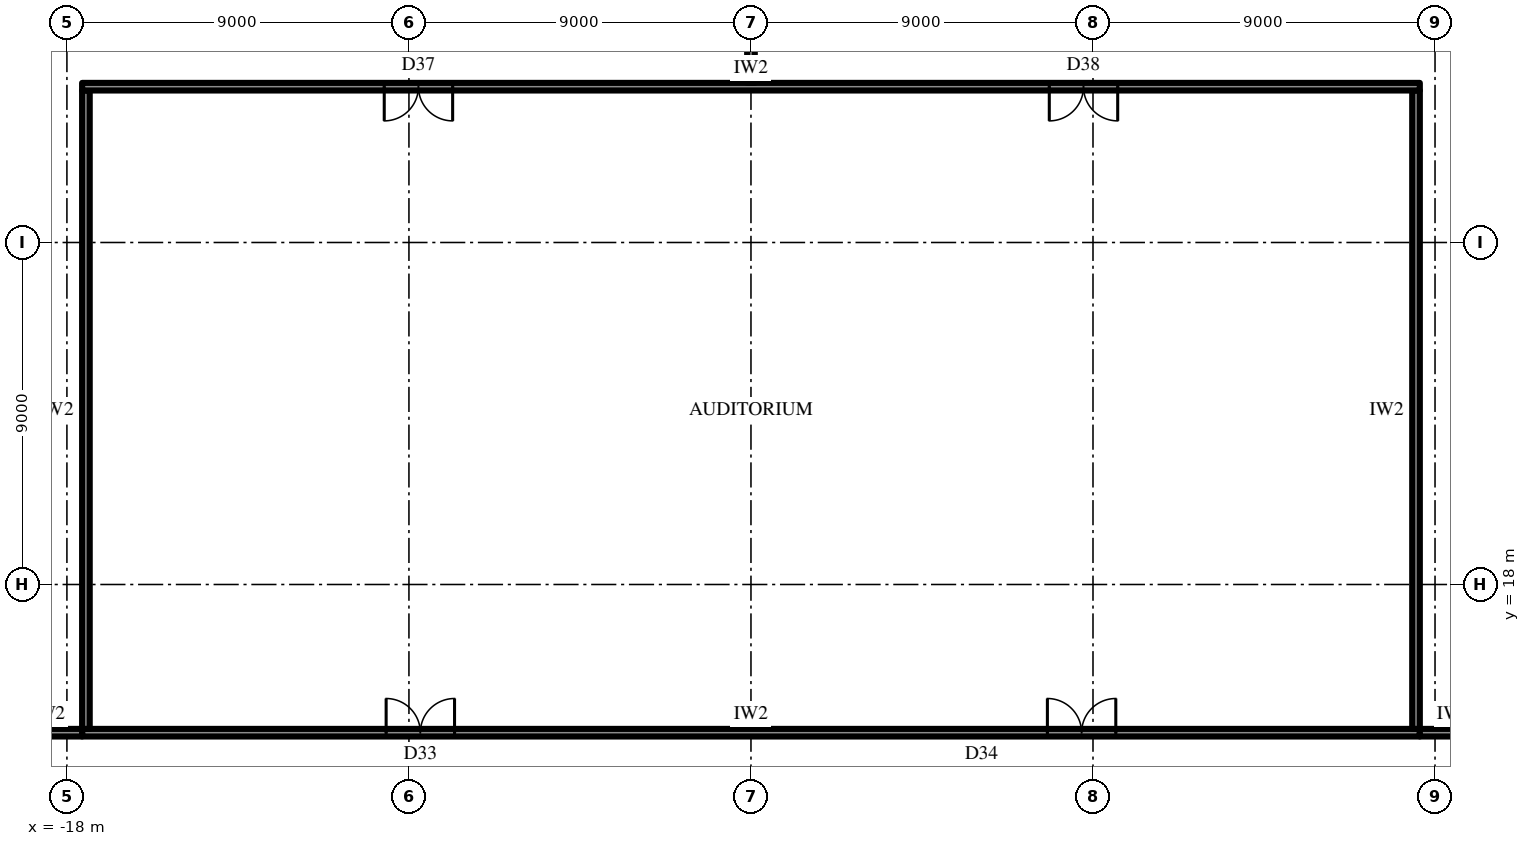
"""IFC4 building model, lengths in metres.
Left out: names, types, materials, properties, quantities, classifications, styles, units other than length and angle.
Written with IfcOpenShell. Run it as: python <this file> out.ifc"""

import sys

from ifc_helpers import new_model, si_unit, direction, frame, frame_2d, origin, place, context, subcontext, project, spatial, rectangle, extrude, element, fill, save


model = new_model("IFC4")
c1 = context("Model", 3, precision=1e-05, world=origin(), true_north=direction((0.0, 1.0)))
c2 = subcontext(c1, "Body", "Model", "MODEL_VIEW")
j1 = project(units=[si_unit("LENGTHUNIT", "METRE"), si_unit("PLANEANGLEUNIT", "RADIAN")], contexts=[c1])
p1 = place(None, origin())
s1 = spatial("IfcSite", under=j1, at=p1, CompositionType="ELEMENT")
p2 = place(p1, origin())
s2 = spatial("IfcBuilding", under=s1, at=p2, CompositionType="ELEMENT")
p3 = place(p2, frame((0.0, 0.0, 7.0)))
s3 = spatial("IfcBuildingStorey", under=s2, at=p3, CompositionType="ELEMENT", Elevation=7.0)
p4 = place(p3, frame((-17.6, 14.1, 0.0), z_axis=(0.0, 0.0, 1.0), x_axis=(1.0, 0.0, 0.0)))
e1 = element("IfcWall", 1, at=p4, inside=s3, PredefinedType="PARTITIONING", context=c2, shape_type="SweptSolid", body=[
    extrude(rectangle(XDim=35.2, YDim=0.2, at=frame_2d((17.6, 0.0))), origin(), (0.0, 0.0, 1.0), 5.65),
])
p5 = place(p4, frame((8.0, 0.0, 0.0)))
e2 = element("IfcOpeningElement", 2, at=p5, cuts=e1, PredefinedType="OPENING", context=c2, shape_type="SweptSolid", body=[
    extrude(rectangle(XDim=1.8, YDim=2.4, at=frame_2d((0.9, 1.2))), frame((0.0, 0.11, 0.0), z_axis=(0.0, -1.0, 0.0), x_axis=(1.0, 0.0, 0.0)), (0.0, 0.0, 1.0), 0.22),
])
p6 = place(p4, frame((25.4, 0.0, 0.0)))
e3 = element("IfcOpeningElement", 3, at=p6, cuts=e1, PredefinedType="OPENING", context=c2, shape_type="SweptSolid", body=[
    extrude(rectangle(XDim=1.8, YDim=2.4, at=frame_2d((0.9, 1.2))), frame((0.0, 0.11, 0.0), z_axis=(0.0, -1.0, 0.0), x_axis=(1.0, 0.0, 0.0)), (0.0, 0.0, 1.0), 0.22),
])
for number, where, z_axis, x_axis in (
    (4, (-17.5, 14.2, 0.0), (0.0, 0.0, 1.0), (0.0, 1.0, 0.0)),
    (5, (17.5, 14.2, 0.0), (0.0, 0.0, 1.0), (0.0, 1.0, 0.0)),
):
    element("IfcWall", number, at=place(p3, frame(where, z_axis=z_axis, x_axis=x_axis)), inside=s3, PredefinedType="PARTITIONING", context=c2, shape_type="SweptSolid", body=[
        extrude(rectangle(XDim=16.8, YDim=0.2, at=frame_2d((8.4, 0.0))), origin(), (0.0, 0.0, 1.0), 5.65),
    ])
p7 = place(p3, frame((-17.6, 31.1, 0.0), z_axis=(0.0, 0.0, 1.0), x_axis=(1.0, 0.0, 0.0)))
e6 = element("IfcWall", 6, at=p7, inside=s3, PredefinedType="PARTITIONING", context=c2, shape_type="SweptSolid", body=[
    extrude(rectangle(XDim=35.2, YDim=0.2, at=frame_2d((17.6, 0.0))), origin(), (0.0, 0.0, 1.0), 5.65),
])
p8 = place(p7, frame((7.95, 0.0, 0.0)))
e7 = element("IfcOpeningElement", 7, at=p8, cuts=e6, PredefinedType="OPENING", context=c2, shape_type="SweptSolid", body=[
    extrude(rectangle(XDim=1.8, YDim=2.4, at=frame_2d((0.9, 1.2))), frame((0.0, 0.11, 0.0), z_axis=(0.0, -1.0, 0.0), x_axis=(1.0, 0.0, 0.0)), (0.0, 0.0, 1.0), 0.22),
])
p9 = place(p7, frame((25.45, 0.0, 0.0)))
e8 = element("IfcOpeningElement", 8, at=p9, cuts=e6, PredefinedType="OPENING", context=c2, shape_type="SweptSolid", body=[
    extrude(rectangle(XDim=1.8, YDim=2.4, at=frame_2d((0.9, 1.2))), frame((0.0, 0.11, 0.0), z_axis=(0.0, -1.0, 0.0), x_axis=(1.0, 0.0, 0.0)), (0.0, 0.0, 1.0), 0.22),
])
for number, where, z_axis, x_axis in (
    (9, (-19.4, 14.1, 0.0), (0.0, 0.0, 1.0), (1.0, 0.0, 0.0)),
    (10, (17.6, 14.1, 0.0), (0.0, 0.0, 1.0), (1.0, 0.0, 0.0)),
):
    element("IfcWall", number, at=place(p3, frame(where, z_axis=z_axis, x_axis=x_axis)), inside=s3, PredefinedType="PARTITIONING", context=c2, shape_type="SweptSolid", body=[
        extrude(rectangle(XDim=1.8, YDim=0.2, at=frame_2d((0.9, 0.0))), origin(), (0.0, 0.0, 1.0), 5.65),
    ])
p10 = place(p3, frame((0.0, 31.2, 0.0), z_axis=(0.0, 0.0, 1.0), x_axis=(0.0, 1.0, 0.0)))
e11 = element("IfcWall", 11, at=p10, inside=s3, PredefinedType="PARTITIONING", context=c2, shape_type="SweptSolid", body=[
    extrude(rectangle(XDim=2.52, YDim=0.2, at=frame_2d((1.26, 0.0))), origin(), (0.0, 0.0, 1.0), 4.594),
])
p11 = place(p8, frame((1.8, 0.0, 0.0), z_axis=(0.0, 0.0, 1.0), x_axis=(-1.0, 0.0, 0.0)))
e12 = element("IfcDoor", 12, at=p11, inside=s3, OperationType="DOUBLE_DOOR_SINGLE_SWING", PredefinedType="DOOR", context=c2, shape_type="SweptSolid", body=[
    extrude(rectangle(XDim=1.8, YDim=2.4, at=frame_2d((0.9, 1.2))), frame((0.0, 0.025, 0.0), z_axis=(0.0, -1.0, 0.0), x_axis=(1.0, 0.0, 0.0)), (0.0, 0.0, 1.0), 0.05),
])
fill(e7, e12)
p12 = place(p9, frame((1.8, 0.0, 0.0), z_axis=(0.0, 0.0, 1.0), x_axis=(-1.0, 0.0, 0.0)))
e13 = element("IfcDoor", 13, at=p12, inside=s3, OperationType="DOUBLE_DOOR_SINGLE_SWING", PredefinedType="DOOR", context=c2, shape_type="SweptSolid", body=[
    extrude(rectangle(XDim=1.8, YDim=2.4, at=frame_2d((0.9, 1.2))), frame((0.0, 0.025, 0.0), z_axis=(0.0, -1.0, 0.0), x_axis=(1.0, 0.0, 0.0)), (0.0, 0.0, 1.0), 0.05),
])
fill(e8, e13)
p13 = place(p5, origin())
e14 = element("IfcDoor", 14, at=p13, inside=s3, OperationType="DOUBLE_DOOR_SINGLE_SWING", PredefinedType="DOOR", context=c2, shape_type="SweptSolid", body=[
    extrude(rectangle(XDim=1.8, YDim=2.4, at=frame_2d((0.9, 1.2))), frame((0.0, 0.025, 0.0), z_axis=(0.0, -1.0, 0.0), x_axis=(1.0, 0.0, 0.0)), (0.0, 0.0, 1.0), 0.05),
])
fill(e2, e14)
p14 = place(p6, origin())
e15 = element("IfcDoor", 15, at=p14, inside=s3, OperationType="DOUBLE_DOOR_SINGLE_SWING", PredefinedType="DOOR", context=c2, shape_type="SweptSolid", body=[
    extrude(rectangle(XDim=1.8, YDim=2.4, at=frame_2d((0.9, 1.2))), frame((0.0, 0.025, 0.0), z_axis=(0.0, -1.0, 0.0), x_axis=(1.0, 0.0, 0.0)), (0.0, 0.0, 1.0), 0.05),
])
fill(e3, e15)
save(model, sys.argv[1])
